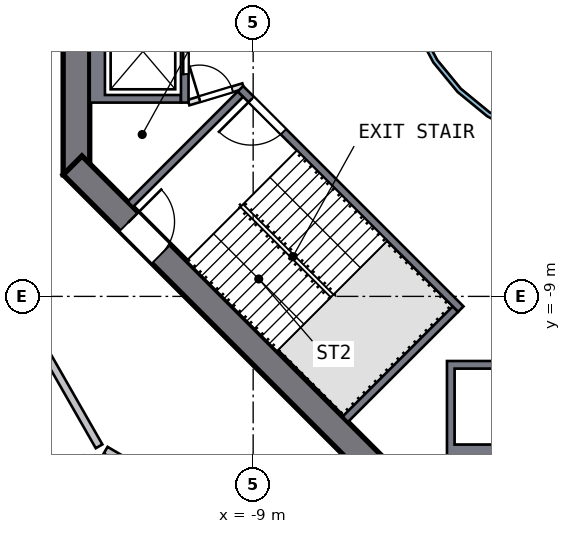
"""IFC4 building model, lengths in metres.
Left out: names, types, materials, properties, quantities, classifications, styles, units other than length and angle.
Written with IfcOpenShell. Run it as: python <this file> out.ifc"""

import sys

from ifc_helpers import new_model, si_unit, direction, frame, frame_2d, origin, place, context, subcontext, project, spatial, polyline, rectangle, outline, extrude, element, fill, save


model = new_model("IFC4")
c1 = context("Model", 3, precision=1e-05, world=origin(), true_north=direction((0.0, 1.0)))
c2 = subcontext(c1, "Body", "Model", "MODEL_VIEW")
j1 = project(units=[si_unit("LENGTHUNIT", "METRE"), si_unit("PLANEANGLEUNIT", "RADIAN")], contexts=[c1])
p1 = place(None, origin())
s1 = spatial("IfcSite", under=j1, at=p1, CompositionType="ELEMENT")
p2 = place(p1, origin())
s2 = spatial("IfcBuilding", under=s1, at=p2, CompositionType="ELEMENT")
p3 = place(p2, frame((0.0, 0.0, 154.0)))
s3 = spatial("IfcBuildingStorey", under=s2, at=p3, CompositionType="ELEMENT", Elevation=154.0)
p4 = place(p3, frame((-13.65, 5.799, 0.0), z_axis=(0.0, 0.0, 1.0), x_axis=(0.0, -1.0, 0.0)))
e1 = element("IfcWall", 1, at=p4, inside=s3, PredefinedType="SHEAR", context=c2, shape_type="SweptSolid", body=[
    extrude(rectangle(XDim=11.598, YDim=0.7, at=frame_2d((5.799, 0.0))), origin(), (0.0, 0.0, 1.0), 4.5),
])
p5 = place(p4, frame((4.899, 0.0, 0.0)))
e2 = element("IfcOpeningElement", 2, at=p5, cuts=e1, PredefinedType="OPENING", context=c2, shape_type="SweptSolid", body=[
    extrude(rectangle(XDim=1.8, YDim=2.1, at=frame_2d((0.9, 1.05))), frame((0.0, 0.36, 0.0), z_axis=(0.0, -1.0, 0.0), x_axis=(1.0, 0.0, 0.0)), (0.0, 0.0, 1.0), 0.72),
])
p6 = place(p3, frame((-13.752, -5.552, 0.0), z_axis=(0.0, 0.0, 1.0), x_axis=(0.707106781, -0.707106781, 0.0)))
e3 = element("IfcWall", 3, at=p6, inside=s3, PredefinedType="SHEAR", context=c2, shape_type="SweptSolid", body=[
    extrude(rectangle(XDim=11.598, YDim=0.7, at=frame_2d((5.799, 0.0))), origin(), (0.0, 0.0, 1.0), 4.5),
])
p7 = place(p6, frame((2.099, 0.0, 0.0)))
e4 = element("IfcOpeningElement", 4, at=p7, cuts=e3, PredefinedType="OPENING", context=c2, shape_type="SweptSolid", body=[
    extrude(rectangle(XDim=1.2, YDim=2.1, at=frame_2d((0.6, 1.05))), frame((0.0, 0.36, 0.0), z_axis=(0.0, -1.0, 0.0), x_axis=(1.0, 0.0, 0.0)), (0.0, 0.0, 1.0), 0.72),
])
p8 = place(p3, origin())
e5 = element("IfcWall", 5, at=p8, inside=s3, PredefinedType="SOLIDWALL", context=c2, shape_type="SweptSolid", body=[
    extrude(outline(polyline([(-13.3, -3.9), (-13.3, -1.2), (-10.9, -1.2), (-10.9, -1.4), (-12.9, -1.4), (-12.9, -3.7), (-10.9, -3.7), (-10.9, -3.9), (-13.3, -3.9)])), origin(), (0.0, 0.0, 1.0), 4.19),
])
p9 = place(p3, frame((-10.8, -1.2, 0.0), z_axis=(0.0, 0.0, 1.0), x_axis=(0.0, -1.0, 0.0)))
e6 = element("IfcWall", 6, at=p9, inside=s3, PredefinedType="SOLIDWALL", context=c2, shape_type="SweptSolid", body=[
    extrude(rectangle(XDim=2.7, YDim=0.2, at=frame_2d((1.35, 0.0))), origin(), (0.0, 0.0, 1.0), 4.19),
])
p10 = place(p9, frame((0.75, 0.0, 0.0)))
e7 = element("IfcOpeningElement", 7, at=p10, cuts=e6, PredefinedType="OPENING", context=c2, shape_type="SweptSolid", body=[
    extrude(rectangle(XDim=1.2, YDim=2.1, at=frame_2d((0.6, 1.05))), frame((0.0, 0.11, 0.0), z_axis=(0.0, -1.0, 0.0), x_axis=(1.0, 0.0, 0.0)), (0.0, 0.0, 1.0), 0.22),
])
p11 = place(p3, origin())
e8 = element("IfcWall", 8, at=p11, inside=s3, PredefinedType="SOLIDWALL", context=c2, shape_type="SweptSolid", body=[
    extrude(outline(polyline([(-1.2, -13.3), (-3.9, -13.3), (-3.9, -10.7), (-1.2, -10.7), (-1.2, -13.3)]), holes=[polyline([(-3.7, -10.9), (-3.7, -12.9), (-1.4, -12.9), (-1.4, -10.9), (-3.7, -10.9)])]), origin(), (0.0, 0.0, 1.0), 4.19),
])
p12 = place(p3, frame((-3.535, -9.334, 0.0), z_axis=(0.0, 0.0, 1.0), x_axis=(-0.707106781, 0.707106781, 0.0)))
e9 = element("IfcWall", 9, at=p12, inside=s3, PredefinedType="SOLIDWALL", context=c2, shape_type="SweptSolid", body=[
    extrude(rectangle(XDim=8.2, YDim=0.2, at=frame_2d((4.1, 0.0))), origin(), (0.0, 0.0, 1.0), 4.19),
])
p13 = place(p12, frame((6.6, 0.0, 0.0)))
e10 = element("IfcOpeningElement", 10, at=p13, cuts=e9, PredefinedType="OPENING", context=c2, shape_type="SweptSolid", body=[
    extrude(rectangle(XDim=1.2, YDim=2.1, at=frame_2d((0.6, 1.05))), frame((0.0, 0.11, 0.0), z_axis=(0.0, -1.0, 0.0), x_axis=(1.0, 0.0, 0.0)), (0.0, 0.0, 1.0), 0.22),
])
for number, where, z_axis, x_axis in (
    (11, (-9.334, -3.677, 0.0), (0.0, 0.0, 1.0), (-0.707, -0.707, 0.0)),
    (12, (-3.677, -9.334, 0.0), (0.0, 0.0, 1.0), (-0.707, -0.707, 0.0)),
):
    element("IfcWall", number, at=place(p3, frame(where, z_axis=z_axis, x_axis=x_axis)), inside=s3, PredefinedType="SOLIDWALL", context=c2, shape_type="SweptSolid", body=[
        extrude(rectangle(XDim=4.1, YDim=0.2, at=frame_2d((2.05, 0.0))), origin(), (0.0, 0.0, 1.0), 4.19),
    ])
p14 = place(p3, frame((-10.7, -3.9, 0.0), z_axis=(0.0, 0.0, 1.0), x_axis=(0.957084567, 0.289808785, 0.0)))
e13 = element("IfcWall", 13, at=p14, inside=s3, PredefinedType="PARTITIONING", context=c2, shape_type="SweptSolid", body=[
    extrude(rectangle(XDim=1.501, YDim=0.15, at=frame_2d((0.75, 0.0))), origin(), (0.0, 0.0, 1.0), 4.19),
])
p15 = place(p14, frame((0.301, 0.0, 0.0)))
e14 = element("IfcOpeningElement", 14, at=p15, cuts=e13, PredefinedType="OPENING", context=c2, shape_type="SweptSolid", body=[
    extrude(rectangle(XDim=0.9, YDim=2.1, at=frame_2d((0.45, 1.05))), frame((0.0, 0.085, 0.0), z_axis=(0.0, -1.0, 0.0), x_axis=(1.0, 0.0, 0.0)), (0.0, 0.0, 1.0), 0.17),
])
p16 = place(p3, origin())
e15 = element("IfcWall", 15, at=p16, inside=s3, PredefinedType="SOLIDWALL", context=c2, shape_type="SweptSolid", body=[
    extrude(outline(polyline([(5.021, -0.999), (4.73, -1.959), (4.257, -2.844), (3.62, -3.62), (2.844, -4.257), (1.959, -4.73), (0.999, -5.021), (0.0, -5.12), (-0.999, -5.021), (-1.959, -4.73), (-2.844, -4.257), (-3.62, -3.62), (-4.257, -2.844), (-4.73, -1.959), (-5.021, -0.999), (-5.12, 0.0), (-5.021, 0.999), (-4.73, 1.959), (-4.257, 2.844), (-3.62, 3.62), (-2.844, 4.257), (-1.959, 4.73), (-0.999, 5.021), (0.0, 5.12), (0.999, 5.021), (1.959, 4.73), (2.844, 4.257), (3.62, 3.62), (4.257, 2.844), (4.73, 1.959), (5.021, 0.999), (5.12, 0.0), (5.021, -0.999)]), holes=[polyline([(4.904, 0.976), (4.619, 1.913), (4.157, 2.778), (3.535, 3.535), (2.778, 4.157), (1.913, 4.619), (0.976, 4.904), (0.0, 5.0), (-0.976, 4.904), (-1.913, 4.619), (-2.778, 4.157), (-3.535, 3.535), (-4.157, 2.778), (-4.619, 1.913), (-4.904, 0.976), (-5.0, 0.0), (-4.904, -0.976), (-4.619, -1.913), (-4.157, -2.778), (-3.535, -3.535), (-2.778, -4.157), (-1.913, -4.619), (-0.976, -4.904), (0.0, -5.0), (0.976, -4.904), (1.913, -4.619), (2.778, -4.157), (3.535, -3.535), (4.157, -2.778), (4.619, -1.913), (4.904, -0.976), (5.0, 0.0), (4.904, 0.976)])]), origin(), (0.0, 0.0, 1.0), 4.19),
])
p17 = place(p3, frame((-17.778, -4.684, 0.0), z_axis=(0.0, 0.0, 1.0), x_axis=(0.496362719, -0.868115229, 0.0)))
e16 = element("IfcWall", 16, at=p17, inside=s3, PredefinedType="SOLIDWALL", context=c2, shape_type="SweptSolid", body=[
    extrude(rectangle(XDim=9.516, YDim=0.2, at=frame_2d((4.758, 0.0))), origin(), (0.0, 0.0, 1.0), 4.19),
])
p18 = place(p3, frame((-12.882, -13.046, 0.0), z_axis=(0.0, 0.0, 1.0), x_axis=(0.863936482, -0.503600789, 0.0)))
e17 = element("IfcWall", 17, at=p18, inside=s3, PredefinedType="SOLIDWALL", context=c2, shape_type="SweptSolid", body=[
    extrude(rectangle(XDim=3.258, YDim=0.2, at=frame_2d((1.629, 0.0))), origin(), (0.0, 0.0, 1.0), 4.19),
])
p19 = place(p10, origin())
e18 = element("IfcDoor", 18, at=p19, inside=s3, OperationType="DOUBLE_DOOR_SLIDING", PredefinedType="DOOR", context=c2, shape_type="SweptSolid", body=[
    extrude(rectangle(XDim=1.2, YDim=2.1, at=frame_2d((0.6, 1.05))), frame((0.0, 0.025, 0.0), z_axis=(0.0, -1.0, 0.0), x_axis=(1.0, 0.0, 0.0)), (0.0, 0.0, 1.0), 0.05),
])
fill(e7, e18)
p20 = place(p13, origin())
e19 = element("IfcDoor", 19, at=p20, inside=s3, OperationType="SINGLE_SWING_RIGHT", PredefinedType="DOOR", context=c2, shape_type="SweptSolid", body=[
    extrude(rectangle(XDim=1.2, YDim=2.1, at=frame_2d((0.6, 1.05))), frame((0.0, 0.025, 0.0), z_axis=(0.0, -1.0, 0.0), x_axis=(1.0, 0.0, 0.0)), (0.0, 0.0, 1.0), 0.05),
])
fill(e10, e19)
p21 = place(p7, origin())
e20 = element("IfcDoor", 20, at=p21, inside=s3, OperationType="SINGLE_SWING_LEFT", PredefinedType="DOOR", context=c2, shape_type="SweptSolid", body=[
    extrude(rectangle(XDim=1.2, YDim=2.1, at=frame_2d((0.6, 1.05))), frame((0.0, 0.025, 0.0), z_axis=(0.0, -1.0, 0.0), x_axis=(1.0, 0.0, 0.0)), (0.0, 0.0, 1.0), 0.05),
])
fill(e4, e20)
p22 = place(p15, origin())
e21 = element("IfcDoor", 21, at=p22, inside=s3, OperationType="SINGLE_SWING_LEFT", PredefinedType="DOOR", context=c2, shape_type="SweptSolid", body=[
    extrude(rectangle(XDim=0.9, YDim=2.1, at=frame_2d((0.45, 1.05))), frame((0.0, 0.025, 0.0), z_axis=(0.0, -1.0, 0.0), x_axis=(1.0, 0.0, 0.0)), (0.0, 0.0, 1.0), 0.05),
])
fill(e14, e21)
save(model, sys.argv[1])
